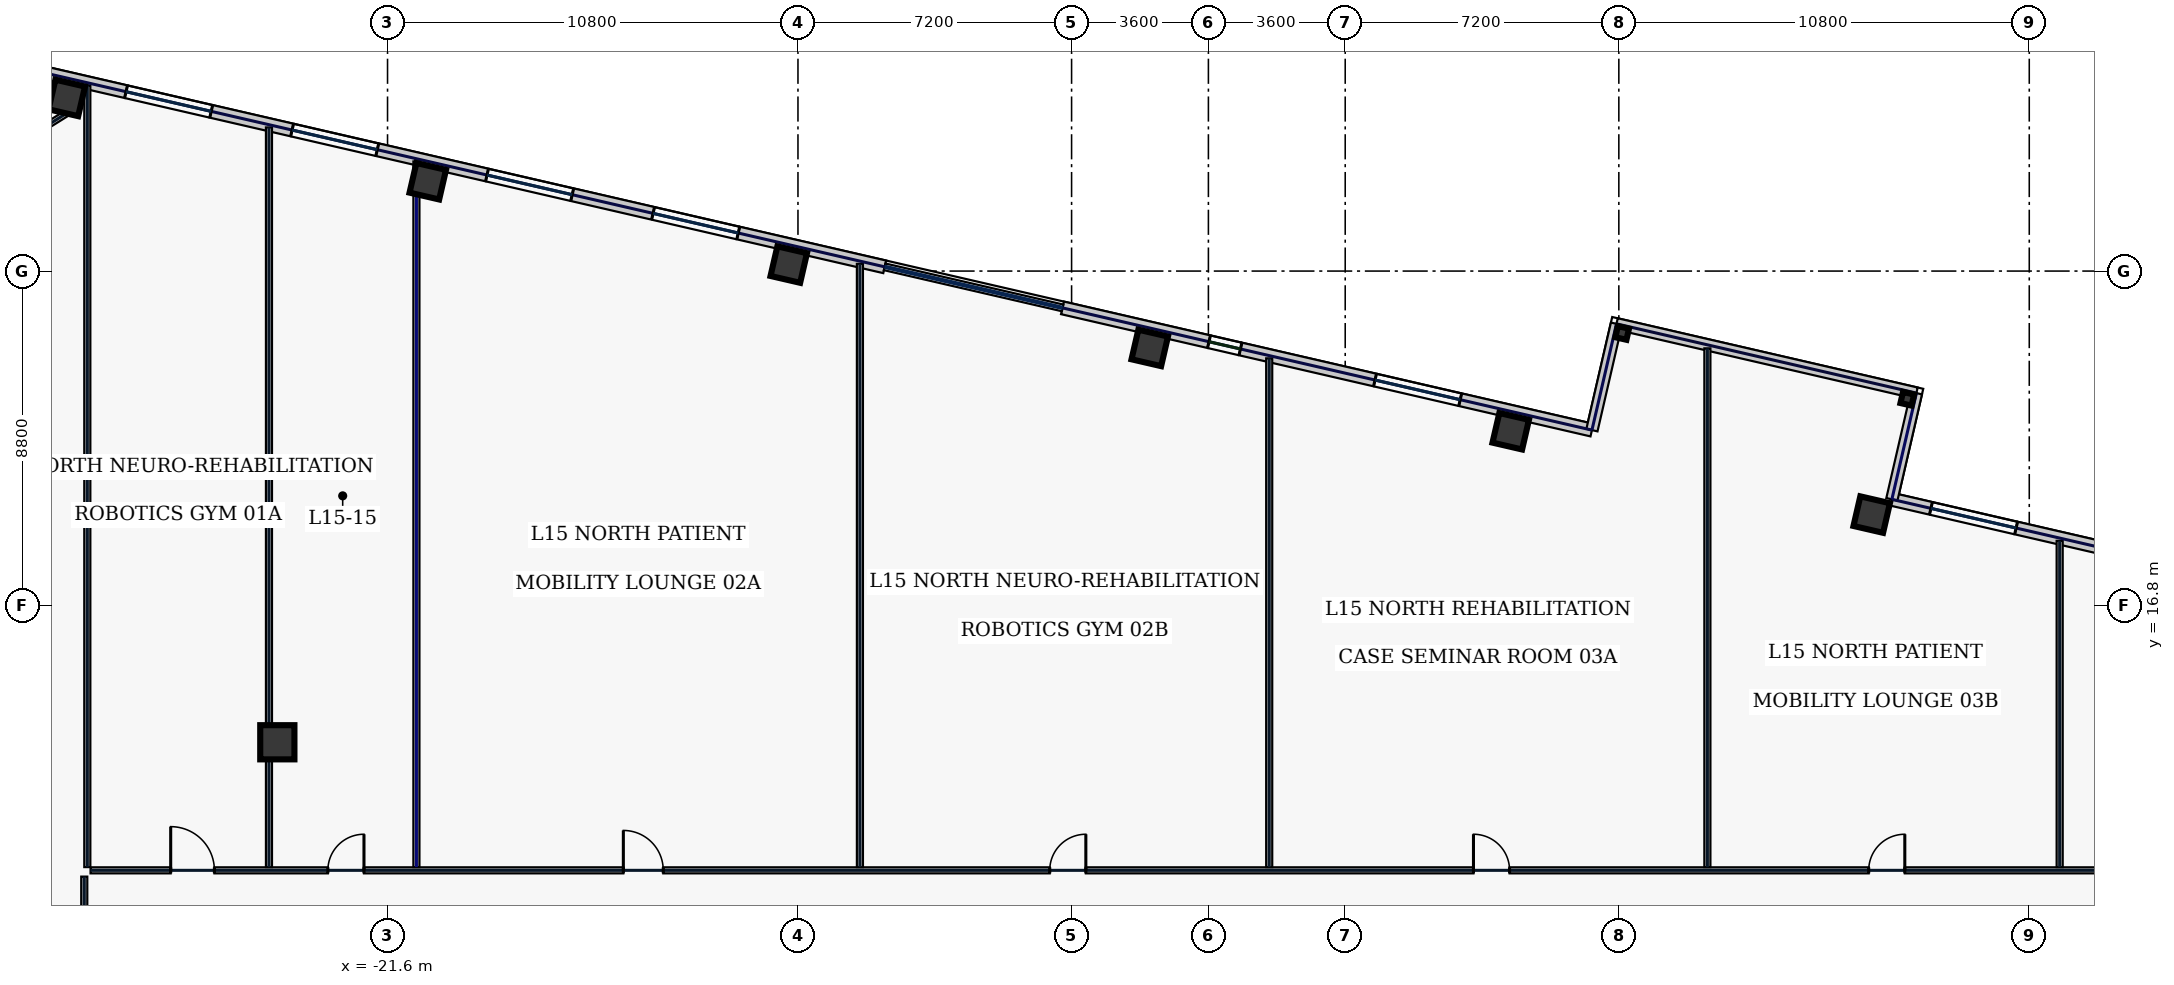
"""IFC4 building model, lengths in metres.
Left out: names, types, materials, properties, quantities, classifications, styles, units other than length and angle.
Written with IfcOpenShell. Run it as: python <this file> out.ifc"""

import sys

from ifc_helpers import new_model, si_unit, direction, frame, frame_2d, origin, origin_2d, place, context, subcontext, project, spatial, rectangle, hollow_rectangle, extrude, element, fill, save


model = new_model("IFC4")
c1 = context("Model", 3, precision=1e-05, world=origin(), true_north=direction((0.0, 1.0)))
c2 = subcontext(c1, "Body", "Model", "MODEL_VIEW")
j1 = project(units=[si_unit("LENGTHUNIT", "METRE"), si_unit("PLANEANGLEUNIT", "RADIAN")], contexts=[c1])
p1 = place(None, origin())
s1 = spatial("IfcSite", under=j1, at=p1, CompositionType="ELEMENT")
p2 = place(p1, origin())
s2 = spatial("IfcBuilding", under=s1, at=p2, CompositionType="ELEMENT")
p3 = place(p2, frame((0.0, 0.0, 71.4)))
s3 = spatial("IfcBuildingStorey", under=s2, at=p3, CompositionType="ELEMENT", Elevation=71.4)
p4 = place(p3, frame((-24.5, 13.2, 0.0), z_axis=(0.0, 0.0, 1.0), x_axis=(1.0, 0.0, 0.0)))
e1 = element("IfcColumn", 1, at=p4, inside=s3, PredefinedType="COLUMN", context=c2, shape_type="SweptSolid", body=[
    extrude(hollow_rectangle(XDim=0.9, YDim=0.9, WallThickness=0.04, at=origin_2d()), origin(), (0.0, 0.0, 1.0), 3.74),
])
for number, where, z_axis, x_axis in (
    (2, (17.454, 19.192, 0.0), (0.0, 0.0, 1.0), (0.974, -0.225, 0.0)),
    (3, (7.955, 21.385, 0.0), (0.0, 0.0, 1.0), (0.974, -0.225, 0.0)),
    (4, (-1.544, 23.578, 0.0), (0.0, 0.0, 1.0), (0.974, -0.225, 0.0)),
    (5, (-11.042, 25.771, 0.0), (0.0, 0.0, 1.0), (0.974, -0.225, 0.0)),
    (6, (-20.541, 27.964, 0.0), (0.0, 0.0, 1.0), (0.974, -0.225, 0.0)),
    (7, (-30.04, 30.156, 0.0), (0.0, 0.0, 1.0), (0.974, -0.225, 0.0)),
):
    element("IfcColumn", number, at=place(p3, frame(where, z_axis=z_axis, x_axis=x_axis)), inside=s3, PredefinedType="COLUMN", context=c2, shape_type="SweptSolid", body=[
        extrude(hollow_rectangle(XDim=0.8, YDim=0.8, WallThickness=0.036, at=origin_2d()), origin(), (0.0, 0.0, 1.0), 3.74),
    ])
for number, where, z_axis, x_axis in (
    (8, (10.888, 23.971, 0.0), (0.0, 0.0, 1.0), (0.974, -0.225, 0.0)),
    (9, (18.391, 22.239, 0.0), (0.0, 0.0, 1.0), (0.974, -0.225, 0.0)),
):
    element("IfcColumn", number, at=place(p3, frame(where, z_axis=z_axis, x_axis=x_axis)), inside=s3, PredefinedType="COLUMN", context=c2, shape_type="SweptSolid", body=[
        extrude(hollow_rectangle(XDim=0.3, YDim=0.3, WallThickness=0.016, at=origin_2d()), origin(), (0.0, 0.0, 1.0), 3.74),
    ])
p5 = place(p3, frame((37.229, 15.15, 0.0), z_axis=(0.0, 0.0, 1.0), x_axis=(-0.974368689865, 0.224957009695, 0.0)))
e10 = element("IfcWall", 10, at=p5, inside=s3, PredefinedType="STANDARD", context=c2, shape_type="SweptSolid", body=[
    extrude(rectangle(XDim=19.75, YDim=0.34, at=frame_2d((9.875, 0.0))), origin(), (0.0, 0.0, 1.0), 3.74),
])
p6 = place(p5, frame((16.395, 0.0, 0.77)))
e11 = element("IfcOpeningElement", 11, at=p6, cuts=e10, PredefinedType="OPENING", context=c2, shape_type="SweptSolid", body=[
    extrude(rectangle(XDim=2.3, YDim=2.1, at=frame_2d((1.15, 1.05))), frame((0.0, 0.18, 0.0), z_axis=(0.0, -1.0, 0.0), x_axis=(1.0, 0.0, 0.0)), (0.0, 0.0, 1.0), 0.36),
])
p7 = place(p5, frame((11.911, 0.0, 0.77)))
e12 = element("IfcOpeningElement", 12, at=p7, cuts=e10, PredefinedType="OPENING", context=c2, shape_type="SweptSolid", body=[
    extrude(rectangle(XDim=2.3, YDim=2.1, at=frame_2d((1.15, 1.05))), frame((0.0, 0.18, 0.0), z_axis=(0.0, -1.0, 0.0), x_axis=(1.0, 0.0, 0.0)), (0.0, 0.0, 1.0), 0.36),
])
p8 = place(p5, frame((2.162, 0.0, 0.77)))
e13 = element("IfcOpeningElement", 13, at=p8, cuts=e10, PredefinedType="OPENING", context=c2, shape_type="SweptSolid", body=[
    extrude(rectangle(XDim=2.3, YDim=2.1, at=frame_2d((1.15, 1.05))), frame((0.0, 0.18, 0.0), z_axis=(0.0, -1.0, 0.0), x_axis=(1.0, 0.0, 0.0)), (0.0, 0.0, 1.0), 0.36),
])
p9 = place(p3, frame((10.092, 21.415, 0.0), z_axis=(0.0, 0.0, 1.0), x_axis=(-0.97436816851, 0.224959267855, 0.0)))
e14 = element("IfcWall", 14, at=p9, inside=s3, PredefinedType="STANDARD", context=c2, shape_type="SweptSolid", body=[
    extrude(rectangle(XDim=14.298, YDim=0.34, at=frame_2d((7.149, 0.0))), origin(), (0.0, 0.0, 1.0), 3.74),
])
p10 = place(p9, frame((9.492, 0.0, 0.77)))
e15 = element("IfcOpeningElement", 15, at=p10, cuts=e14, PredefinedType="OPENING", context=c2, shape_type="SweptSolid", body=[
    extrude(rectangle(XDim=0.85, YDim=1.85, at=frame_2d((0.425, 0.925))), frame((0.0, 0.18, 0.0), z_axis=(0.0, -1.0, 0.0), x_axis=(1.0, 0.0, 0.0)), (0.0, 0.0, 1.0), 0.36),
])
p11 = place(p9, frame((3.558, 0.0, 0.77)))
e16 = element("IfcOpeningElement", 16, at=p11, cuts=e14, PredefinedType="OPENING", context=c2, shape_type="SweptSolid", body=[
    extrude(rectangle(XDim=2.3, YDim=2.1, at=frame_2d((1.15, 1.05))), frame((0.0, 0.18, 0.0), z_axis=(0.0, -1.0, 0.0), x_axis=(1.0, 0.0, 0.0)), (0.0, 0.0, 1.0), 0.36),
])
p12 = place(p3, frame((-8.517, 25.711, 0.0), z_axis=(0.0, 0.0, 1.0), x_axis=(-0.974372845456, 0.224939009598, 0.0)))
e17 = element("IfcWall", 17, at=p12, inside=s3, PredefinedType="STANDARD", context=c2, shape_type="SweptSolid", body=[
    extrude(rectangle(XDim=22.652, YDim=0.34, at=frame_2d((11.326, 0.0))), origin(), (0.0, 0.0, 1.0), 3.74),
])
p13 = place(p12, frame((18.189, 0.0, 0.77)))
e18 = element("IfcOpeningElement", 18, at=p13, cuts=e17, PredefinedType="OPENING", context=c2, shape_type="SweptSolid", body=[
    extrude(rectangle(XDim=2.3, YDim=2.1, at=frame_2d((1.15, 1.05))), frame((0.0, 0.18, 0.0), z_axis=(0.0, -1.0, 0.0), x_axis=(1.0, 0.0, 0.0)), (0.0, 0.0, 1.0), 0.36),
])
p14 = place(p12, frame((13.705, 0.0, 0.77)))
e19 = element("IfcOpeningElement", 19, at=p14, cuts=e17, PredefinedType="OPENING", context=c2, shape_type="SweptSolid", body=[
    extrude(rectangle(XDim=2.3, YDim=2.1, at=frame_2d((1.15, 1.05))), frame((0.0, 0.18, 0.0), z_axis=(0.0, -1.0, 0.0), x_axis=(1.0, 0.0, 0.0)), (0.0, 0.0, 1.0), 0.36),
])
p15 = place(p12, frame((8.441, 0.0, 0.77)))
e20 = element("IfcOpeningElement", 20, at=p15, cuts=e17, PredefinedType="OPENING", context=c2, shape_type="SweptSolid", body=[
    extrude(rectangle(XDim=2.3, YDim=2.1, at=frame_2d((1.15, 1.05))), frame((0.0, 0.18, 0.0), z_axis=(0.0, -1.0, 0.0), x_axis=(1.0, 0.0, 0.0)), (0.0, 0.0, 1.0), 0.36),
])
p16 = place(p12, frame((3.956, 0.0, 0.77)))
e21 = element("IfcOpeningElement", 21, at=p16, cuts=e17, PredefinedType="OPENING", context=c2, shape_type="SweptSolid", body=[
    extrude(rectangle(XDim=2.3, YDim=2.1, at=frame_2d((1.15, 1.05))), frame((0.0, 0.18, 0.0), z_axis=(0.0, -1.0, 0.0), x_axis=(1.0, 0.0, 0.0)), (0.0, 0.0, 1.0), 0.36),
])
p17 = place(p3, frame((10.092, 21.415, 0.0), z_axis=(0.0, 0.0, 1.0), x_axis=(0.225002397841, 0.97435820978, 0.0)))
e22 = element("IfcWall", 22, at=p17, inside=s3, PredefinedType="STANDARD", context=c2, shape_type="SweptSolid", body=[
    extrude(rectangle(XDim=2.87, YDim=0.3, at=frame_2d((1.435, 0.0))), origin(), (0.0, 0.0, 1.0), 3.285),
])
p18 = place(p3, frame((17.985, 19.593, 0.0), z_axis=(0.0, 0.0, 1.0), x_axis=(0.224921635065, 0.974376856293, 0.0)))
e23 = element("IfcWall", 23, at=p18, inside=s3, PredefinedType="STANDARD", context=c2, shape_type="SweptSolid", body=[
    extrude(rectangle(XDim=2.87, YDim=0.3, at=frame_2d((1.435, 0.0))), origin(), (0.0, 0.0, 1.0), 3.74),
])
p19 = place(p3, frame((10.738, 24.211, 0.0), z_axis=(0.0, 0.0, 1.0), x_axis=(0.974371888243, -0.224943155936, 0.0)))
e24 = element("IfcWall", 24, at=p19, inside=s3, PredefinedType="STANDARD", context=c2, shape_type="SweptSolid", body=[
    extrude(rectangle(XDim=8.1, YDim=0.3, at=frame_2d((4.05, 0.0))), origin(), (0.0, 0.0, 1.0), 3.385),
])
p20 = place(p3, frame((-29.86, 29.868, 0.0), z_axis=(0.0, 0.0, 1.0), x_axis=(-0.848043064089, -0.529927317139, 0.0)))
e25 = element("IfcWall", 25, at=p20, inside=s3, PredefinedType="PARTITIONING", context=c2, shape_type="SweptSolid", body=[
    extrude(rectangle(XDim=7.354, YDim=0.16, at=frame_2d((3.677, 0.0))), origin(), (0.0, 0.0, 1.0), 3.74),
])
p21 = place(p3, frame((-29.58, -9.615, 0.0), z_axis=(0.0, 0.0, 1.0), x_axis=(0.0, 1.0, 0.0)))
e26 = element("IfcWall", 26, at=p21, inside=s3, PredefinedType="PARTITIONING", context=c2, shape_type="SweptSolid", body=[
    extrude(rectangle(XDim=19.28, YDim=0.16, at=frame_2d((9.64, 0.0))), origin(), (0.0, 0.0, 1.0), 3.74),
])
p22 = place(p21, frame((1.969, 0.0, 0.0)))
e27 = element("IfcOpeningElement", 27, at=p22, cuts=e26, PredefinedType="OPENING", context=c2, shape_type="SweptSolid", body=[
    extrude(rectangle(XDim=0.95, YDim=2.2, at=frame_2d((0.475, 1.1))), frame((0.0, 0.09, 0.0), z_axis=(0.0, -1.0, 0.0), x_axis=(1.0, 0.0, 0.0)), (0.0, 0.0, 1.0), 0.18),
])
p23 = place(p21, frame((7.25, 0.0, 0.0)))
e28 = element("IfcOpeningElement", 28, at=p23, cuts=e26, PredefinedType="OPENING", context=c2, shape_type="SweptSolid", body=[
    extrude(rectangle(XDim=0.95, YDim=2.2, at=frame_2d((0.475, 1.1))), frame((0.0, 0.09, 0.0), z_axis=(0.0, -1.0, 0.0), x_axis=(1.0, 0.0, 0.0)), (0.0, 0.0, 1.0), 0.18),
])
p24 = place(p21, frame((12.45, 0.0, 0.0)))
e29 = element("IfcOpeningElement", 29, at=p24, cuts=e26, PredefinedType="OPENING", context=c2, shape_type="SweptSolid", body=[
    extrude(rectangle(XDim=0.95, YDim=2.2, at=frame_2d((0.475, 1.1))), frame((0.0, 0.09, 0.0), z_axis=(0.0, -1.0, 0.0), x_axis=(1.0, 0.0, 0.0)), (0.0, 0.0, 1.0), 0.18),
])
p25 = place(p21, frame((16.506, 0.0, 0.0)))
e30 = element("IfcOpeningElement", 30, at=p25, cuts=e26, PredefinedType="OPENING", context=c2, shape_type="SweptSolid", body=[
    extrude(rectangle(XDim=0.95, YDim=2.2, at=frame_2d((0.475, 1.1))), frame((0.0, 0.09, 0.0), z_axis=(0.0, -1.0, 0.0), x_axis=(1.0, 0.0, 0.0)), (0.0, 0.0, 1.0), 0.18),
])
p26 = place(p3, frame((-29.415, 9.83, 0.0), z_axis=(0.0, 0.0, 1.0), x_axis=(1.0, 0.0, 0.0)))
e31 = element("IfcWall", 31, at=p26, inside=s3, PredefinedType="PARTITIONING", context=c2, shape_type="SweptSolid", body=[
    extrude(rectangle(XDim=58.83, YDim=0.16, at=frame_2d((29.415, 0.0))), origin(), (0.0, 0.0, 1.0), 3.74),
])
p27 = place(p26, frame((2.109, 0.0, 0.0)))
e32 = element("IfcOpeningElement", 32, at=p27, cuts=e31, PredefinedType="OPENING", context=c2, shape_type="SweptSolid", body=[
    extrude(rectangle(XDim=1.15, YDim=2.2, at=frame_2d((0.575, 1.1))), frame((0.0, 0.09, 0.0), z_axis=(0.0, -1.0, 0.0), x_axis=(1.0, 0.0, 0.0)), (0.0, 0.0, 1.0), 0.18),
])
p28 = place(p26, frame((6.245, 0.0, 0.0)))
e33 = element("IfcOpeningElement", 33, at=p28, cuts=e31, PredefinedType="OPENING", context=c2, shape_type="SweptSolid", body=[
    extrude(rectangle(XDim=0.95, YDim=2.2, at=frame_2d((0.475, 1.1))), frame((0.0, 0.09, 0.0), z_axis=(0.0, -1.0, 0.0), x_axis=(1.0, 0.0, 0.0)), (0.0, 0.0, 1.0), 0.18),
])
p29 = place(p26, frame((14.02, 0.0, 0.0)))
e34 = element("IfcOpeningElement", 34, at=p29, cuts=e31, PredefinedType="OPENING", context=c2, shape_type="SweptSolid", body=[
    extrude(rectangle(XDim=1.05, YDim=2.2, at=frame_2d((0.525, 1.1))), frame((0.0, 0.09, 0.0), z_axis=(0.0, -1.0, 0.0), x_axis=(1.0, 0.0, 0.0)), (0.0, 0.0, 1.0), 0.18),
])
p30 = place(p26, frame((25.24, 0.0, 0.0)))
e35 = element("IfcOpeningElement", 35, at=p30, cuts=e31, PredefinedType="OPENING", context=c2, shape_type="SweptSolid", body=[
    extrude(rectangle(XDim=0.95, YDim=2.2, at=frame_2d((0.475, 1.1))), frame((0.0, 0.09, 0.0), z_axis=(0.0, -1.0, 0.0), x_axis=(1.0, 0.0, 0.0)), (0.0, 0.0, 1.0), 0.18),
])
p31 = place(p26, frame((36.39, 0.0, 0.0)))
e36 = element("IfcOpeningElement", 36, at=p31, cuts=e31, PredefinedType="OPENING", context=c2, shape_type="SweptSolid", body=[
    extrude(rectangle(XDim=0.95, YDim=2.2, at=frame_2d((0.475, 1.1))), frame((0.0, 0.09, 0.0), z_axis=(0.0, -1.0, 0.0), x_axis=(1.0, 0.0, 0.0)), (0.0, 0.0, 1.0), 0.18),
])
p32 = place(p26, frame((46.79, 0.0, 0.0)))
e37 = element("IfcOpeningElement", 37, at=p32, cuts=e31, PredefinedType="OPENING", context=c2, shape_type="SweptSolid", body=[
    extrude(rectangle(XDim=0.95, YDim=2.2, at=frame_2d((0.475, 1.1))), frame((0.0, 0.09, 0.0), z_axis=(0.0, -1.0, 0.0), x_axis=(1.0, 0.0, 0.0)), (0.0, 0.0, 1.0), 0.18),
])
p33 = place(p26, frame((54.781, 0.0, 0.0)))
e38 = element("IfcOpeningElement", 38, at=p33, cuts=e31, PredefinedType="OPENING", context=c2, shape_type="SweptSolid", body=[
    extrude(rectangle(XDim=0.95, YDim=2.2, at=frame_2d((0.475, 1.1))), frame((0.0, 0.09, 0.0), z_axis=(0.0, -1.0, 0.0), x_axis=(1.0, 0.0, 0.0)), (0.0, 0.0, 1.0), 0.18),
])
p34 = place(p3, frame((-29.5, 9.915, 0.0), z_axis=(0.0, 0.0, 1.0), x_axis=(0.0, 1.0, 0.0)))
e39 = element("IfcWall", 39, at=p34, inside=s3, PredefinedType="PARTITIONING", context=c2, shape_type="SweptSolid", body=[
    extrude(rectangle(XDim=20.569, YDim=0.16, at=frame_2d((10.284, 0.0))), origin(), (0.0, 0.0, 1.0), 3.74),
])
p35 = place(p3, frame((-20.84, 9.915, 0.0), z_axis=(0.0, 0.0, 1.0), x_axis=(0.0, 1.0, 0.0)))
e40 = element("IfcWall", 40, at=p35, inside=s3, PredefinedType="PARTITIONING", context=c2, shape_type="SweptSolid", body=[
    extrude(rectangle(XDim=18.569, YDim=0.16, at=frame_2d((9.285, 0.0))), origin(), (0.0, 0.0, 1.0), 3.235),
])
p36 = place(p3, frame((1.6, 9.915, 0.0), z_axis=(0.0, 0.0, 1.0), x_axis=(0.0, 1.0, 0.0)))
e41 = element("IfcWall", 41, at=p36, inside=s3, PredefinedType="PARTITIONING", context=c2, shape_type="SweptSolid", body=[
    extrude(rectangle(XDim=13.389, YDim=0.16, at=frame_2d((6.694, 0.0))), origin(), (0.0, 0.0, 1.0), 3.74),
])
p37 = place(p3, frame((22.4, 9.915, 0.0), z_axis=(0.0, 0.0, 1.0), x_axis=(0.0, 1.0, 0.0)))
e42 = element("IfcWall", 42, at=p37, inside=s3, PredefinedType="PARTITIONING", context=c2, shape_type="SweptSolid", body=[
    extrude(rectangle(XDim=8.586, YDim=0.16, at=frame_2d((4.293, 0.0))), origin(), (0.0, 0.0, 1.0), 3.74),
])
p38 = place(p3, frame((-24.72, 9.915, 0.0), z_axis=(0.0, 0.0, 1.0), x_axis=(0.0, 1.0, 0.0)))
e43 = element("IfcWall", 43, at=p38, inside=s3, PredefinedType="PARTITIONING", context=c2, shape_type="SweptSolid", body=[
    extrude(rectangle(XDim=19.465, YDim=0.16, at=frame_2d((9.732, 0.0))), origin(), (0.0, 0.0, 1.0), 3.74),
])
p39 = place(p3, frame((-9.17, 9.915, 0.0), z_axis=(0.0, 0.0, 1.0), x_axis=(0.0, 1.0, 0.0)))
e44 = element("IfcWall", 44, at=p39, inside=s3, PredefinedType="PARTITIONING", context=c2, shape_type="SweptSolid", body=[
    extrude(rectangle(XDim=15.875, YDim=0.16, at=frame_2d((7.938, 0.0))), origin(), (0.0, 0.0, 1.0), 3.74),
])
p40 = place(p3, frame((13.13, 9.915, 0.0), z_axis=(0.0, 0.0, 1.0), x_axis=(0.0, 1.0, 0.0)))
e45 = element("IfcWall", 45, at=p40, inside=s3, PredefinedType="PARTITIONING", context=c2, shape_type="SweptSolid", body=[
    extrude(rectangle(XDim=13.652, YDim=0.16, at=frame_2d((6.826, 0.0))), origin(), (0.0, 0.0, 1.0), 3.74),
])
p41 = place(p6, origin())
e46 = element("IfcWindow", 46, at=p41, inside=s3, PartitioningType="SINGLE_PANEL", PredefinedType="WINDOW", context=c2, shape_type="SweptSolid", body=[
    extrude(rectangle(XDim=2.3, YDim=2.1, at=frame_2d((1.15, 1.05))), frame((0.0, 0.03, 0.0), z_axis=(0.0, -1.0, 0.0), x_axis=(1.0, 0.0, 0.0)), (0.0, 0.0, 1.0), 0.06),
])
fill(e11, e46)
p42 = place(p10, origin())
e47 = element("IfcWindow", 47, at=p42, inside=s3, PartitioningType="SINGLE_PANEL", PredefinedType="WINDOW", context=c2, shape_type="SweptSolid", body=[
    extrude(rectangle(XDim=0.85, YDim=1.85, at=frame_2d((0.425, 0.925))), frame((0.0, 0.03, 0.0), z_axis=(0.0, -1.0, 0.0), x_axis=(1.0, 0.0, 0.0)), (0.0, 0.0, 1.0), 0.06),
])
fill(e15, e47)
p43 = place(p11, origin())
e48 = element("IfcWindow", 48, at=p43, inside=s3, PartitioningType="SINGLE_PANEL", PredefinedType="WINDOW", context=c2, shape_type="SweptSolid", body=[
    extrude(rectangle(XDim=2.3, YDim=2.1, at=frame_2d((1.15, 1.05))), frame((0.0, 0.03, 0.0), z_axis=(0.0, -1.0, 0.0), x_axis=(1.0, 0.0, 0.0)), (0.0, 0.0, 1.0), 0.06),
])
fill(e16, e48)
p44 = place(p13, origin())
e49 = element("IfcWindow", 49, at=p44, inside=s3, PartitioningType="SINGLE_PANEL", PredefinedType="WINDOW", context=c2, shape_type="SweptSolid", body=[
    extrude(rectangle(XDim=2.3, YDim=2.1, at=frame_2d((1.15, 1.05))), frame((0.0, 0.03, 0.0), z_axis=(0.0, -1.0, 0.0), x_axis=(1.0, 0.0, 0.0)), (0.0, 0.0, 1.0), 0.06),
])
fill(e18, e49)
p45 = place(p14, origin())
e50 = element("IfcWindow", 50, at=p45, inside=s3, PartitioningType="SINGLE_PANEL", PredefinedType="WINDOW", context=c2, shape_type="SweptSolid", body=[
    extrude(rectangle(XDim=2.3, YDim=2.1, at=frame_2d((1.15, 1.05))), frame((0.0, 0.03, 0.0), z_axis=(0.0, -1.0, 0.0), x_axis=(1.0, 0.0, 0.0)), (0.0, 0.0, 1.0), 0.06),
])
fill(e19, e50)
p46 = place(p15, origin())
e51 = element("IfcWindow", 51, at=p46, inside=s3, PartitioningType="SINGLE_PANEL", PredefinedType="WINDOW", context=c2, shape_type="SweptSolid", body=[
    extrude(rectangle(XDim=2.3, YDim=2.1, at=frame_2d((1.15, 1.05))), frame((0.0, 0.03, 0.0), z_axis=(0.0, -1.0, 0.0), x_axis=(1.0, 0.0, 0.0)), (0.0, 0.0, 1.0), 0.06),
])
fill(e20, e51)
p47 = place(p16, origin())
e52 = element("IfcWindow", 52, at=p47, inside=s3, PartitioningType="SINGLE_PANEL", PredefinedType="WINDOW", context=c2, shape_type="SweptSolid", body=[
    extrude(rectangle(XDim=2.3, YDim=2.1, at=frame_2d((1.15, 1.05))), frame((0.0, 0.03, 0.0), z_axis=(0.0, -1.0, 0.0), x_axis=(1.0, 0.0, 0.0)), (0.0, 0.0, 1.0), 0.06),
])
fill(e21, e52)
p48 = place(p27, origin())
e53 = element("IfcDoor", 53, at=p48, inside=s3, OperationType="SINGLE_SWING_LEFT", PredefinedType="DOOR", context=c2, shape_type="SweptSolid", body=[
    extrude(rectangle(XDim=1.15, YDim=2.2, at=frame_2d((0.575, 1.1))), frame((0.0, 0.025, 0.0), z_axis=(0.0, -1.0, 0.0), x_axis=(1.0, 0.0, 0.0)), (0.0, 0.0, 1.0), 0.05),
])
fill(e32, e53)
p49 = place(p28, origin())
e54 = element("IfcDoor", 54, at=p49, inside=s3, OperationType="SINGLE_SWING_RIGHT", PredefinedType="DOOR", context=c2, shape_type="SweptSolid", body=[
    extrude(rectangle(XDim=0.95, YDim=2.2, at=frame_2d((0.475, 1.1))), frame((0.0, 0.025, 0.0), z_axis=(0.0, -1.0, 0.0), x_axis=(1.0, 0.0, 0.0)), (0.0, 0.0, 1.0), 0.05),
])
fill(e33, e54)
p50 = place(p29, origin())
e55 = element("IfcDoor", 55, at=p50, inside=s3, OperationType="SINGLE_SWING_LEFT", PredefinedType="DOOR", context=c2, shape_type="SweptSolid", body=[
    extrude(rectangle(XDim=1.05, YDim=2.2, at=frame_2d((0.525, 1.1))), frame((0.0, 0.025, 0.0), z_axis=(0.0, -1.0, 0.0), x_axis=(1.0, 0.0, 0.0)), (0.0, 0.0, 1.0), 0.05),
])
fill(e34, e55)
p51 = place(p30, origin())
e56 = element("IfcDoor", 56, at=p51, inside=s3, OperationType="SINGLE_SWING_RIGHT", PredefinedType="DOOR", context=c2, shape_type="SweptSolid", body=[
    extrude(rectangle(XDim=0.95, YDim=2.2, at=frame_2d((0.475, 1.1))), frame((0.0, 0.025, 0.0), z_axis=(0.0, -1.0, 0.0), x_axis=(1.0, 0.0, 0.0)), (0.0, 0.0, 1.0), 0.05),
])
fill(e35, e56)
p52 = place(p31, origin())
e57 = element("IfcDoor", 57, at=p52, inside=s3, OperationType="SINGLE_SWING_LEFT", PredefinedType="DOOR", context=c2, shape_type="SweptSolid", body=[
    extrude(rectangle(XDim=0.95, YDim=2.2, at=frame_2d((0.475, 1.1))), frame((0.0, 0.025, 0.0), z_axis=(0.0, -1.0, 0.0), x_axis=(1.0, 0.0, 0.0)), (0.0, 0.0, 1.0), 0.05),
])
fill(e36, e57)
p53 = place(p32, origin())
e58 = element("IfcDoor", 58, at=p53, inside=s3, OperationType="SINGLE_SWING_RIGHT", PredefinedType="DOOR", context=c2, shape_type="SweptSolid", body=[
    extrude(rectangle(XDim=0.95, YDim=2.2, at=frame_2d((0.475, 1.1))), frame((0.0, 0.025, 0.0), z_axis=(0.0, -1.0, 0.0), x_axis=(1.0, 0.0, 0.0)), (0.0, 0.0, 1.0), 0.05),
])
fill(e37, e58)
save(model, sys.argv[1])
